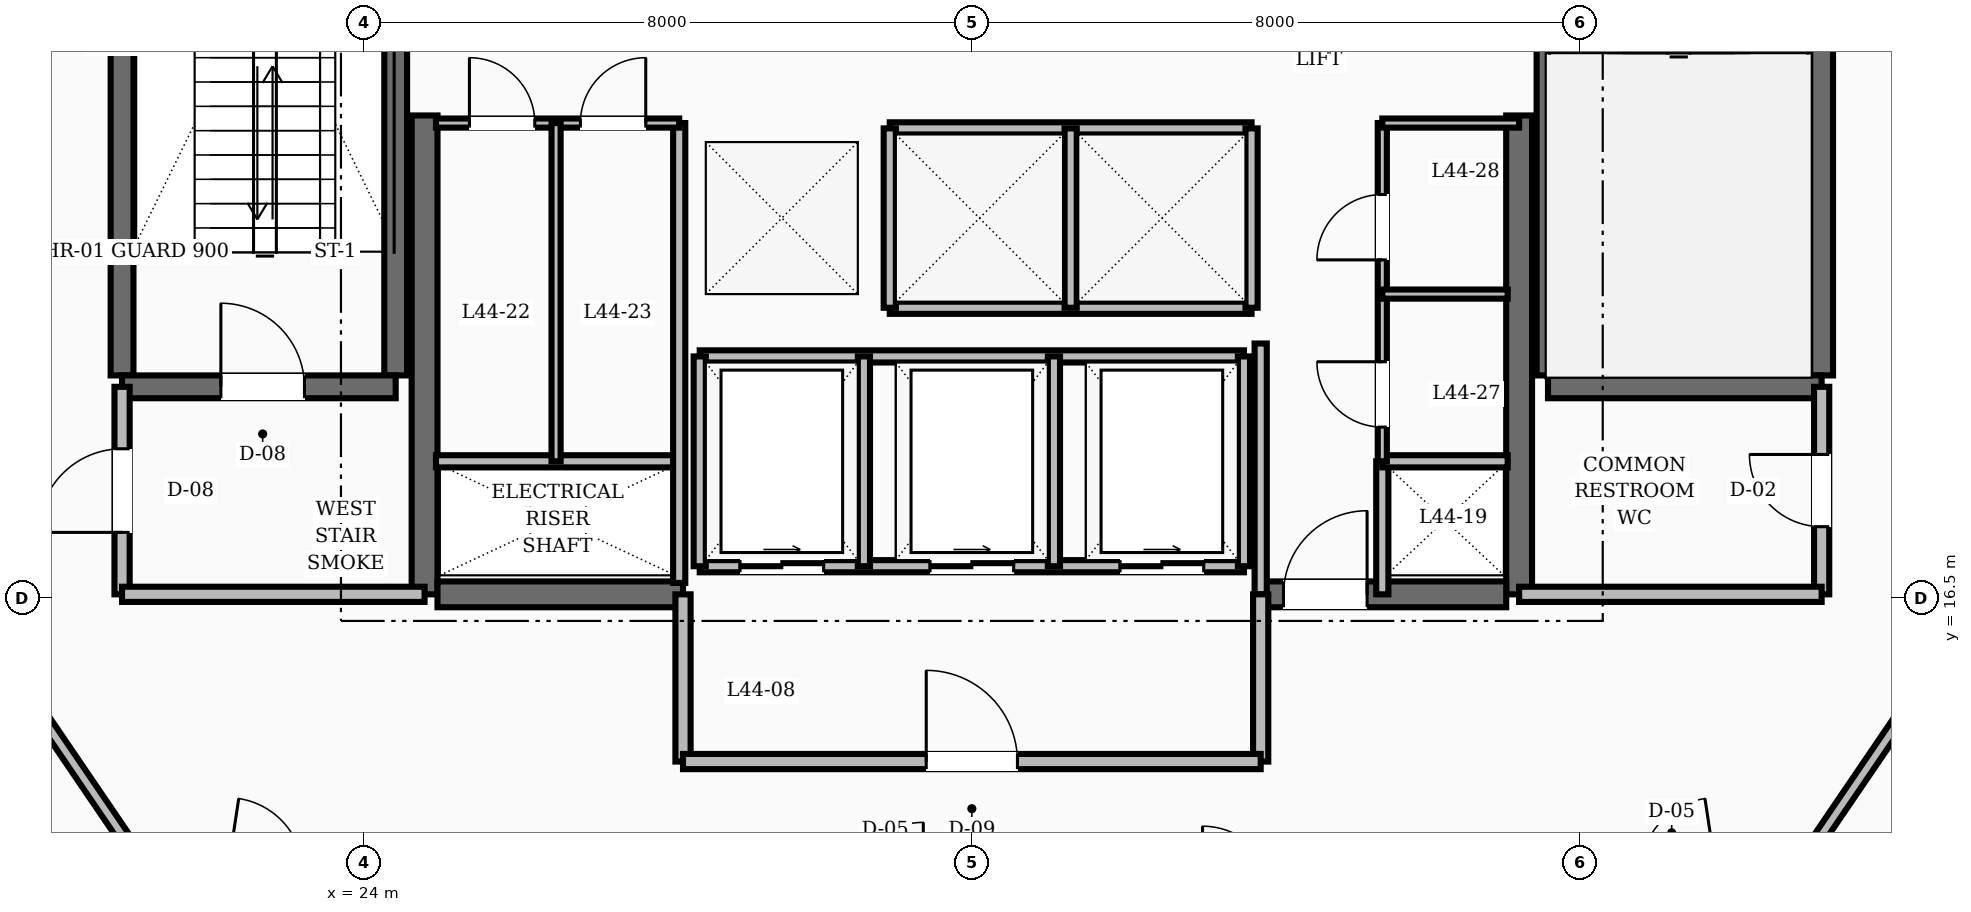
"""IFC4 building model, lengths in metres.
Left out: names, types, materials, properties, quantities, classifications, styles, units other than length and angle.
Written with IfcOpenShell. Run it as: python <this file> out.ifc"""

import sys

from ifc_helpers import new_model, si_unit, direction, frame, frame_2d, origin, place, context, subcontext, project, spatial, rectangle, extrude, element, fill, save


model = new_model("IFC4")
c1 = context("Model", 3, precision=1e-05, world=origin(), true_north=direction((0.0, 1.0)))
c2 = subcontext(c1, "Body", "Model", "MODEL_VIEW")
j1 = project(units=[si_unit("LENGTHUNIT", "METRE"), si_unit("PLANEANGLEUNIT", "RADIAN")], contexts=[c1])
p1 = place(None, origin())
s1 = spatial("IfcSite", under=j1, at=p1, CompositionType="ELEMENT")
p2 = place(p1, origin())
s2 = spatial("IfcBuilding", under=s1, at=p2, CompositionType="ELEMENT")
p3 = place(p2, frame((0.0, 0.0, 171.2)))
s3 = spatial("IfcBuildingStorey", under=s2, at=p3, CompositionType="ELEMENT", Elevation=171.2)
for number, where, z_axis, x_axis in (
    (1, (24.8, 16.55, 0.0), (0.0, 0.0, 1.0), (0.0, 1.0, 0.0)),
    (2, (39.2, 16.55, 0.0), (0.0, 0.0, 1.0), (0.0, 1.0, 0.0)),
):
    element("IfcWall", number, at=place(p3, frame(where, z_axis=z_axis, x_axis=x_axis)), inside=s3, PredefinedType="SHEAR", context=c2, shape_type="SweptSolid", body=[
        extrude(rectangle(XDim=6.3, YDim=0.34, at=frame_2d((3.15, 0.0))), origin(), (0.0, 0.0, 1.0), 3.6),
    ])
p4 = place(p3, frame((24.97, 16.55, 0.0), z_axis=(0.0, 0.0, 1.0), x_axis=(1.0, 0.0, 0.0)))
e3 = element("IfcWall", 3, at=p4, inside=s3, PredefinedType="SHEAR", context=c2, shape_type="SweptSolid", body=[
    extrude(rectangle(XDim=3.23, YDim=0.34, at=frame_2d((1.615, 0.0))), origin(), (0.0, 0.0, 1.0), 3.6),
])
p5 = place(p3, frame((35.8, 16.55, 0.0), z_axis=(0.0, 0.0, 1.0), x_axis=(1.0, 0.0, 0.0)))
e4 = element("IfcWall", 4, at=p5, inside=s3, PredefinedType="SHEAR", context=c2, shape_type="SweptSolid", body=[
    extrude(rectangle(XDim=3.23, YDim=0.34, at=frame_2d((1.615, 0.0))), origin(), (0.0, 0.0, 1.0), 3.6),
])
p6 = place(p5, frame((0.3, 0.0, 0.0)))
e5 = element("IfcOpeningElement", 5, at=p6, cuts=e4, PredefinedType="OPENING", context=c2, shape_type="SweptSolid", body=[
    extrude(rectangle(XDim=1.1, YDim=2.1, at=frame_2d((0.55, 1.05))), frame((0.0, 0.18, 0.0), z_axis=(0.0, -1.0, 0.0), x_axis=(1.0, 0.0, 0.0)), (0.0, 0.0, 1.0), 0.36),
])
for number, where, z_axis, x_axis in (
    (6, (20.82, 19.43, 0.0), (0.0, 0.0, 1.0), (0.0, 1.0, 0.0)),
    (7, (24.42, 19.43, 0.0), (0.0, 0.0, 1.0), (0.0, 1.0, 0.0)),
):
    element("IfcWall", number, at=place(p3, frame(where, z_axis=z_axis, x_axis=x_axis)), inside=s3, PredefinedType="SHEAR", context=c2, shape_type="SweptSolid", body=[
        extrude(rectangle(XDim=8.74, YDim=0.3, at=frame_2d((4.37, 0.0))), origin(), (0.0, 0.0, 1.0), 3.6),
    ])
p7 = place(p3, frame((20.82, 19.28, 0.0), z_axis=(0.0, 0.0, 1.0), x_axis=(1.0, 0.0, 0.0)))
e8 = element("IfcWall", 8, at=p7, inside=s3, PredefinedType="SHEAR", context=c2, shape_type="SweptSolid", body=[
    extrude(rectangle(XDim=3.6, YDim=0.3, at=frame_2d((1.8, 0.0))), origin(), (0.0, 0.0, 1.0), 3.6),
])
p8 = place(p7, frame((1.3, 0.0, 0.0)))
e9 = element("IfcOpeningElement", 9, at=p8, cuts=e8, PredefinedType="OPENING", context=c2, shape_type="SweptSolid", body=[
    extrude(rectangle(XDim=1.1, YDim=2.1, at=frame_2d((0.55, 1.05))), frame((0.0, 0.16, 0.0), z_axis=(0.0, -1.0, 0.0), x_axis=(1.0, 0.0, 0.0)), (0.0, 0.0, 1.0), 0.32),
])
for number, where, z_axis, x_axis in (
    (10, (43.18, 19.43, 0.0), (0.0, 0.0, 1.0), (0.0, 1.0, 0.0)),
    (11, (39.58, 19.43, 0.0), (0.0, 0.0, 1.0), (0.0, 1.0, 0.0)),
):
    element("IfcWall", number, at=place(p3, frame(where, z_axis=z_axis, x_axis=x_axis)), inside=s3, PredefinedType="SHEAR", context=c2, shape_type="SweptSolid", body=[
        extrude(rectangle(XDim=8.74, YDim=0.3, at=frame_2d((4.37, 0.0))), origin(), (0.0, 0.0, 1.0), 3.6),
    ])
p9 = place(p3, frame((39.58, 19.28, 0.0), z_axis=(0.0, 0.0, 1.0), x_axis=(1.0, 0.0, 0.0)))
e12 = element("IfcWall", 12, at=p9, inside=s3, PredefinedType="SHEAR", context=c2, shape_type="SweptSolid", body=[
    extrude(rectangle(XDim=3.6, YDim=0.3, at=frame_2d((1.8, 0.0))), origin(), (0.0, 0.0, 1.0), 3.6),
])
p10 = place(p3, frame((20.82, 16.55, 0.0), z_axis=(0.0, 0.0, 1.0), x_axis=(0.0, 1.0, 0.0)))
e13 = element("IfcWall", 13, at=p10, inside=s3, PredefinedType="SOLIDWALL", context=c2, shape_type="SweptSolid", body=[
    extrude(rectangle(XDim=2.73, YDim=0.2, at=frame_2d((1.365, 0.0))), origin(), (0.0, 0.0, 1.0), 2.8),
])
p11 = place(p10, frame((0.815, 0.0, 0.0)))
e14 = element("IfcOpeningElement", 14, at=p11, cuts=e13, PredefinedType="OPENING", context=c2, shape_type="SweptSolid", body=[
    extrude(rectangle(XDim=1.1, YDim=2.1, at=frame_2d((0.55, 1.05))), frame((0.0, 0.11, 0.0), z_axis=(0.0, -1.0, 0.0), x_axis=(1.0, 0.0, 0.0)), (0.0, 0.0, 1.0), 0.22),
])
p12 = place(p3, frame((20.82, 16.55, 0.0), z_axis=(0.0, 0.0, 1.0), x_axis=(1.0, 0.0, 0.0)))
e15 = element("IfcWall", 15, at=p12, inside=s3, PredefinedType="SOLIDWALL", context=c2, shape_type="SweptSolid", body=[
    extrude(rectangle(XDim=3.98, YDim=0.2, at=frame_2d((1.99, 0.0))), origin(), (0.0, 0.0, 1.0), 2.8),
])
p13 = place(p3, frame((43.18, 16.55, 0.0), z_axis=(0.0, 0.0, 1.0), x_axis=(0.0, 1.0, 0.0)))
e16 = element("IfcWall", 16, at=p13, inside=s3, PredefinedType="SOLIDWALL", context=c2, shape_type="SweptSolid", body=[
    extrude(rectangle(XDim=2.73, YDim=0.2, at=frame_2d((1.365, 0.0))), origin(), (0.0, 0.0, 1.0), 2.8),
])
p14 = place(p13, frame((0.89, 0.0, 0.0)))
e17 = element("IfcOpeningElement", 17, at=p14, cuts=e16, PredefinedType="OPENING", context=c2, shape_type="SweptSolid", body=[
    extrude(rectangle(XDim=0.95, YDim=2.1, at=frame_2d((0.475, 1.05))), frame((0.0, 0.11, 0.0), z_axis=(0.0, -1.0, 0.0), x_axis=(1.0, 0.0, 0.0)), (0.0, 0.0, 1.0), 0.22),
])
p15 = place(p3, frame((39.2, 16.55, 0.0), z_axis=(0.0, 0.0, 1.0), x_axis=(1.0, 0.0, 0.0)))
e18 = element("IfcWall", 18, at=p15, inside=s3, PredefinedType="SOLIDWALL", context=c2, shape_type="SweptSolid", body=[
    extrude(rectangle(XDim=3.98, YDim=0.2, at=frame_2d((1.99, 0.0))), origin(), (0.0, 0.0, 1.0), 2.8),
])
p16 = place(p3, frame((35.8, 16.55, 0.0), z_axis=(0.0, 0.0, 1.0), x_axis=(0.0, 1.0, 0.0)))
e19 = element("IfcWall", 19, at=p16, inside=s3, PredefinedType="SOLIDWALL", context=c2, shape_type="SweptSolid", body=[
    extrude(rectangle(XDim=3.3, YDim=0.16, at=frame_2d((1.65, 0.0))), origin(), (0.0, 0.0, 1.0), 2.8),
])
p17 = place(p3, frame((37.4, 16.55, 0.0), z_axis=(0.0, 0.0, 1.0), x_axis=(0.0, 1.0, 0.0)))
e20 = element("IfcWall", 20, at=p17, inside=s3, PredefinedType="SOLIDWALL", context=c2, shape_type="SweptSolid", body=[
    extrude(rectangle(XDim=1.75, YDim=0.16, at=frame_2d((0.875, 0.0))), origin(), (0.0, 0.0, 1.0), 2.8),
])
for number, where, z_axis, x_axis in (
    (21, (28.2, 14.35, 0.0), (0.0, 0.0, 1.0), (0.0, 1.0, 0.0)),
    (22, (35.8, 14.35, 0.0), (0.0, 0.0, 1.0), (0.0, 1.0, 0.0)),
):
    element("IfcWall", number, at=place(p3, frame(where, z_axis=z_axis, x_axis=x_axis)), inside=s3, PredefinedType="SOLIDWALL", context=c2, shape_type="SweptSolid", body=[
        extrude(rectangle(XDim=2.2, YDim=0.2, at=frame_2d((1.1, 0.0))), origin(), (0.0, 0.0, 1.0), 2.8),
    ])
p18 = place(p3, frame((28.2, 14.35, 0.0), z_axis=(0.0, 0.0, 1.0), x_axis=(1.0, 0.0, 0.0)))
e23 = element("IfcWall", 23, at=p18, inside=s3, PredefinedType="SOLIDWALL", context=c2, shape_type="SweptSolid", body=[
    extrude(rectangle(XDim=7.6, YDim=0.2, at=frame_2d((3.8, 0.0))), origin(), (0.0, 0.0, 1.0), 2.8),
])
p19 = place(p18, frame((3.2, 0.0, 0.0)))
e24 = element("IfcOpeningElement", 24, at=p19, cuts=e23, PredefinedType="OPENING", context=c2, shape_type="SweptSolid", body=[
    extrude(rectangle(XDim=1.2, YDim=2.1, at=frame_2d((0.6, 1.05))), frame((0.0, 0.11, 0.0), z_axis=(0.0, -1.0, 0.0), x_axis=(1.0, 0.0, 0.0)), (0.0, 0.0, 1.0), 0.22),
])
for number, where, z_axis, x_axis in (
    (25, (30.92, 22.68, 0.0), (0.0, 0.0, 1.0), (1.0, 0.0, 0.0)),
    (26, (30.92, 20.32, 0.0), (0.0, 0.0, 1.0), (1.0, 0.0, 0.0)),
):
    element("IfcWall", number, at=place(p3, frame(where, z_axis=z_axis, x_axis=x_axis)), inside=s3, PredefinedType="SOLIDWALL", context=c2, shape_type="SweptSolid", body=[
        extrude(rectangle(XDim=4.76, YDim=0.16, at=frame_2d((2.38, 0.0))), origin(), (0.0, 0.0, 1.0), 2.8),
    ])
for number, where, z_axis, x_axis in (
    (27, (30.92, 20.32, 0.0), (0.0, 0.0, 1.0), (0.0, 1.0, 0.0)),
    (28, (33.3, 20.32, 0.0), (0.0, 0.0, 1.0), (0.0, 1.0, 0.0)),
    (29, (35.68, 20.32, 0.0), (0.0, 0.0, 1.0), (0.0, 1.0, 0.0)),
):
    element("IfcWall", number, at=place(p3, frame(where, z_axis=z_axis, x_axis=x_axis)), inside=s3, PredefinedType="SOLIDWALL", context=c2, shape_type="SweptSolid", body=[
        extrude(rectangle(XDim=2.36, YDim=0.16, at=frame_2d((1.18, 0.0))), origin(), (0.0, 0.0, 1.0), 2.8),
    ])
p20 = place(p3, frame((28.42, 16.92, 0.0), z_axis=(0.0, 0.0, 1.0), x_axis=(1.0, 0.0, 0.0)))
e30 = element("IfcWall", 30, at=p20, inside=s3, PredefinedType="SOLIDWALL", context=c2, shape_type="SweptSolid", body=[
    extrude(rectangle(XDim=7.16, YDim=0.16, at=frame_2d((3.58, 0.0))), origin(), (0.0, 0.0, 1.0), 2.8),
])
p21 = place(p20, frame((0.53, 0.0, 0.0)))
e31 = element("IfcOpeningElement", 31, at=p21, cuts=e30, PredefinedType="OPENING", context=c2, shape_type="SweptSolid", body=[
    extrude(rectangle(XDim=1.1, YDim=2.15, at=frame_2d((0.55, 1.075))), frame((0.0, 0.09, 0.0), z_axis=(0.0, -1.0, 0.0), x_axis=(1.0, 0.0, 0.0)), (0.0, 0.0, 1.0), 0.18),
])
p22 = place(p20, frame((3.03, 0.0, 0.0)))
e32 = element("IfcOpeningElement", 32, at=p22, cuts=e30, PredefinedType="OPENING", context=c2, shape_type="SweptSolid", body=[
    extrude(rectangle(XDim=1.1, YDim=2.15, at=frame_2d((0.55, 1.075))), frame((0.0, 0.09, 0.0), z_axis=(0.0, -1.0, 0.0), x_axis=(1.0, 0.0, 0.0)), (0.0, 0.0, 1.0), 0.18),
])
p23 = place(p20, frame((5.53, 0.0, 0.0)))
e33 = element("IfcOpeningElement", 33, at=p23, cuts=e30, PredefinedType="OPENING", context=c2, shape_type="SweptSolid", body=[
    extrude(rectangle(XDim=1.1, YDim=2.15, at=frame_2d((0.55, 1.075))), frame((0.0, 0.09, 0.0), z_axis=(0.0, -1.0, 0.0), x_axis=(1.0, 0.0, 0.0)), (0.0, 0.0, 1.0), 0.18),
])
p24 = place(p3, frame((28.42, 19.68, 0.0), z_axis=(0.0, 0.0, 1.0), x_axis=(1.0, 0.0, 0.0)))
e34 = element("IfcWall", 34, at=p24, inside=s3, PredefinedType="SOLIDWALL", context=c2, shape_type="SweptSolid", body=[
    extrude(rectangle(XDim=7.16, YDim=0.16, at=frame_2d((3.58, 0.0))), origin(), (0.0, 0.0, 1.0), 2.8),
])
for number, where, z_axis, x_axis in (
    (35, (28.42, 16.92, 0.0), (0.0, 0.0, 1.0), (0.0, 1.0, 0.0)),
    (36, (30.58, 16.92, 0.0), (0.0, 0.0, 1.0), (0.0, 1.0, 0.0)),
    (37, (33.08, 16.92, 0.0), (0.0, 0.0, 1.0), (0.0, 1.0, 0.0)),
    (38, (35.58, 16.92, 0.0), (0.0, 0.0, 1.0), (0.0, 1.0, 0.0)),
):
    element("IfcWall", number, at=place(p3, frame(where, z_axis=z_axis, x_axis=x_axis)), inside=s3, PredefinedType="SOLIDWALL", context=c2, shape_type="SweptSolid", body=[
        extrude(rectangle(XDim=2.76, YDim=0.16, at=frame_2d((1.38, 0.0))), origin(), (0.0, 0.0, 1.0), 2.8),
    ])
p25 = place(p3, frame((24.95, 18.3, 0.0), z_axis=(0.0, 0.0, 1.0), x_axis=(1.0, 0.0, 0.0)))
e39 = element("IfcWall", 39, at=p25, inside=s3, PredefinedType="SOLIDWALL", context=c2, shape_type="SweptSolid", body=[
    extrude(rectangle(XDim=3.2, YDim=0.16, at=frame_2d((1.6, 0.0))), origin(), (0.0, 0.0, 1.0), 2.8),
])
p26 = place(p3, frame((28.15, 16.7, 0.0), z_axis=(0.0, 0.0, 1.0), x_axis=(0.0, 1.0, 0.0)))
e40 = element("IfcWall", 40, at=p26, inside=s3, PredefinedType="SOLIDWALL", context=c2, shape_type="SweptSolid", body=[
    extrude(rectangle(XDim=6.05, YDim=0.16, at=frame_2d((3.025, 0.0))), origin(), (0.0, 0.0, 1.0), 2.8),
])
p27 = place(p3, frame((37.4, 18.3, 0.0), z_axis=(0.0, 0.0, 1.0), x_axis=(1.0, 0.0, 0.0)))
e41 = element("IfcWall", 41, at=p27, inside=s3, PredefinedType="SOLIDWALL", context=c2, shape_type="SweptSolid", body=[
    extrude(rectangle(XDim=1.65, YDim=0.16, at=frame_2d((0.825, 0.0))), origin(), (0.0, 0.0, 1.0), 2.8),
])
p28 = place(p3, frame((24.95, 22.75, 0.0), z_axis=(0.0, 0.0, 1.0), x_axis=(1.0, 0.0, 0.0)))
e42 = element("IfcWall", 42, at=p28, inside=s3, PredefinedType="PARTITIONING", context=c2, shape_type="SweptSolid", body=[
    extrude(rectangle(XDim=3.2, YDim=0.12, at=frame_2d((1.6, 0.0))), origin(), (0.0, 0.0, 1.0), 2.8),
])
p29 = place(p28, frame((0.44, 0.0, 0.0)))
e43 = element("IfcOpeningElement", 43, at=p29, cuts=e42, PredefinedType="OPENING", context=c2, shape_type="SweptSolid", body=[
    extrude(rectangle(XDim=0.86, YDim=2.1, at=frame_2d((0.43, 1.05))), frame((0.0, 0.07, 0.0), z_axis=(0.0, -1.0, 0.0), x_axis=(1.0, 0.0, 0.0)), (0.0, 0.0, 1.0), 0.14),
])
p30 = place(p28, frame((1.9, 0.0, 0.0)))
e44 = element("IfcOpeningElement", 44, at=p30, cuts=e42, PredefinedType="OPENING", context=c2, shape_type="SweptSolid", body=[
    extrude(rectangle(XDim=0.86, YDim=2.1, at=frame_2d((0.43, 1.05))), frame((0.0, 0.07, 0.0), z_axis=(0.0, -1.0, 0.0), x_axis=(1.0, 0.0, 0.0)), (0.0, 0.0, 1.0), 0.14),
])
p31 = place(p3, frame((37.4, 18.3, 0.0), z_axis=(0.0, 0.0, 1.0), x_axis=(0.0, 1.0, 0.0)))
e45 = element("IfcWall", 45, at=p31, inside=s3, PredefinedType="PARTITIONING", context=c2, shape_type="SweptSolid", body=[
    extrude(rectangle(XDim=4.45, YDim=0.12, at=frame_2d((2.225, 0.0))), origin(), (0.0, 0.0, 1.0), 2.8),
])
p32 = place(p31, frame((0.45, 0.0, 0.0)))
e46 = element("IfcOpeningElement", 46, at=p32, cuts=e45, PredefinedType="OPENING", context=c2, shape_type="SweptSolid", body=[
    extrude(rectangle(XDim=0.86, YDim=2.1, at=frame_2d((0.43, 1.05))), frame((0.0, 0.07, 0.0), z_axis=(0.0, -1.0, 0.0), x_axis=(1.0, 0.0, 0.0)), (0.0, 0.0, 1.0), 0.14),
])
p33 = place(p31, frame((2.65, 0.0, 0.0)))
e47 = element("IfcOpeningElement", 47, at=p33, cuts=e45, PredefinedType="OPENING", context=c2, shape_type="SweptSolid", body=[
    extrude(rectangle(XDim=0.86, YDim=2.1, at=frame_2d((0.43, 1.05))), frame((0.0, 0.07, 0.0), z_axis=(0.0, -1.0, 0.0), x_axis=(1.0, 0.0, 0.0)), (0.0, 0.0, 1.0), 0.14),
])
p34 = place(p3, frame((37.4, 22.75, 0.0), z_axis=(0.0, 0.0, 1.0), x_axis=(1.0, 0.0, 0.0)))
e48 = element("IfcWall", 48, at=p34, inside=s3, PredefinedType="PARTITIONING", context=c2, shape_type="SweptSolid", body=[
    extrude(rectangle(XDim=1.8, YDim=0.12, at=frame_2d((0.9, 0.0))), origin(), (0.0, 0.0, 1.0), 2.8),
])
p35 = place(p3, frame((26.53, 18.3, 0.0), z_axis=(0.0, 0.0, 1.0), x_axis=(0.0, 1.0, 0.0)))
e49 = element("IfcWall", 49, at=p35, inside=s3, PredefinedType="PARTITIONING", context=c2, shape_type="SweptSolid", body=[
    extrude(rectangle(XDim=4.45, YDim=0.12, at=frame_2d((2.225, 0.0))), origin(), (0.0, 0.0, 1.0), 2.8),
])
p36 = place(p3, frame((37.4, 20.5, 0.0), z_axis=(0.0, 0.0, 1.0), x_axis=(1.0, 0.0, 0.0)))
e50 = element("IfcWall", 50, at=p36, inside=s3, PredefinedType="PARTITIONING", context=c2, shape_type="SweptSolid", body=[
    extrude(rectangle(XDim=1.65, YDim=0.12, at=frame_2d((0.825, 0.0))), origin(), (0.0, 0.0, 1.0), 2.8),
])
for number, where, z_axis, x_axis in (
    (51, (19.35, 15.548, 0.0), (0.0, 0.0, 1.0), (0.563, -0.827, 0.0)),
    (52, (42.95, 13.05, 0.0), (0.0, 0.0, 1.0), (0.563, 0.827, 0.0)),
):
    element("IfcWall", number, at=place(p3, frame(where, z_axis=z_axis, x_axis=x_axis)), inside=s3, PredefinedType="SOLIDWALL", context=c2, shape_type="SweptSolid", body=[
        extrude(rectangle(XDim=3.021, YDim=0.16, at=frame_2d((1.511, 0.0))), origin(), (0.0, 0.0, 1.0), 2.8),
    ])
p37 = place(p8, origin())
e53 = element("IfcDoor", 53, at=p37, inside=s3, OperationType="SINGLE_SWING_LEFT", PredefinedType="DOOR", context=c2, shape_type="SweptSolid", body=[
    extrude(rectangle(XDim=1.1, YDim=2.1, at=frame_2d((0.55, 1.05))), frame((0.0, 0.025, 0.0), z_axis=(0.0, -1.0, 0.0), x_axis=(1.0, 0.0, 0.0)), (0.0, 0.0, 1.0), 0.05),
])
fill(e9, e53)
p38 = place(p11, origin())
e54 = element("IfcDoor", 54, at=p38, inside=s3, OperationType="SINGLE_SWING_LEFT", PredefinedType="DOOR", context=c2, shape_type="SweptSolid", body=[
    extrude(rectangle(XDim=1.1, YDim=2.1, at=frame_2d((0.55, 1.05))), frame((0.0, 0.025, 0.0), z_axis=(0.0, -1.0, 0.0), x_axis=(1.0, 0.0, 0.0)), (0.0, 0.0, 1.0), 0.05),
])
fill(e14, e54)
p39 = place(p14, origin())
e55 = element("IfcDoor", 55, at=p39, inside=s3, OperationType="SINGLE_SWING_RIGHT", PredefinedType="DOOR", context=c2, shape_type="SweptSolid", body=[
    extrude(rectangle(XDim=0.95, YDim=2.1, at=frame_2d((0.475, 1.05))), frame((0.0, 0.025, 0.0), z_axis=(0.0, -1.0, 0.0), x_axis=(1.0, 0.0, 0.0)), (0.0, 0.0, 1.0), 0.05),
])
fill(e17, e55)
p40 = place(p6, origin())
e56 = element("IfcDoor", 56, at=p40, inside=s3, OperationType="SINGLE_SWING_RIGHT", PredefinedType="DOOR", context=c2, shape_type="SweptSolid", body=[
    extrude(rectangle(XDim=1.1, YDim=2.1, at=frame_2d((0.55, 1.05))), frame((0.0, 0.025, 0.0), z_axis=(0.0, -1.0, 0.0), x_axis=(1.0, 0.0, 0.0)), (0.0, 0.0, 1.0), 0.05),
])
fill(e5, e56)
p41 = place(p19, origin())
e57 = element("IfcDoor", 57, at=p41, inside=s3, OperationType="SINGLE_SWING_LEFT", PredefinedType="DOOR", context=c2, shape_type="SweptSolid", body=[
    extrude(rectangle(XDim=1.2, YDim=2.1, at=frame_2d((0.6, 1.05))), frame((0.0, 0.025, 0.0), z_axis=(0.0, -1.0, 0.0), x_axis=(1.0, 0.0, 0.0)), (0.0, 0.0, 1.0), 0.05),
])
fill(e24, e57)
p42 = place(p21, origin())
e58 = element("IfcDoor", 58, at=p42, inside=s3, OperationType="SLIDING_TO_RIGHT", PredefinedType="DOOR", context=c2, shape_type="SweptSolid", body=[
    extrude(rectangle(XDim=1.1, YDim=2.15, at=frame_2d((0.55, 1.075))), frame((0.0, 0.025, 0.0), z_axis=(0.0, -1.0, 0.0), x_axis=(1.0, 0.0, 0.0)), (0.0, 0.0, 1.0), 0.05),
])
fill(e31, e58)
p43 = place(p22, origin())
e59 = element("IfcDoor", 59, at=p43, inside=s3, OperationType="SLIDING_TO_RIGHT", PredefinedType="DOOR", context=c2, shape_type="SweptSolid", body=[
    extrude(rectangle(XDim=1.1, YDim=2.15, at=frame_2d((0.55, 1.075))), frame((0.0, 0.025, 0.0), z_axis=(0.0, -1.0, 0.0), x_axis=(1.0, 0.0, 0.0)), (0.0, 0.0, 1.0), 0.05),
])
fill(e32, e59)
p44 = place(p23, origin())
e60 = element("IfcDoor", 60, at=p44, inside=s3, OperationType="SLIDING_TO_RIGHT", PredefinedType="DOOR", context=c2, shape_type="SweptSolid", body=[
    extrude(rectangle(XDim=1.1, YDim=2.15, at=frame_2d((0.55, 1.075))), frame((0.0, 0.025, 0.0), z_axis=(0.0, -1.0, 0.0), x_axis=(1.0, 0.0, 0.0)), (0.0, 0.0, 1.0), 0.05),
])
fill(e33, e60)
p45 = place(p29, origin())
e61 = element("IfcDoor", 61, at=p45, inside=s3, OperationType="SINGLE_SWING_LEFT", PredefinedType="DOOR", context=c2, shape_type="SweptSolid", body=[
    extrude(rectangle(XDim=0.86, YDim=2.1, at=frame_2d((0.43, 1.05))), frame((0.0, 0.025, 0.0), z_axis=(0.0, -1.0, 0.0), x_axis=(1.0, 0.0, 0.0)), (0.0, 0.0, 1.0), 0.05),
])
fill(e43, e61)
p46 = place(p30, origin())
e62 = element("IfcDoor", 62, at=p46, inside=s3, OperationType="SINGLE_SWING_RIGHT", PredefinedType="DOOR", context=c2, shape_type="SweptSolid", body=[
    extrude(rectangle(XDim=0.86, YDim=2.1, at=frame_2d((0.43, 1.05))), frame((0.0, 0.025, 0.0), z_axis=(0.0, -1.0, 0.0), x_axis=(1.0, 0.0, 0.0)), (0.0, 0.0, 1.0), 0.05),
])
fill(e44, e62)
p47 = place(p32, origin())
e63 = element("IfcDoor", 63, at=p47, inside=s3, OperationType="SINGLE_SWING_RIGHT", PredefinedType="DOOR", context=c2, shape_type="SweptSolid", body=[
    extrude(rectangle(XDim=0.86, YDim=2.1, at=frame_2d((0.43, 1.05))), frame((0.0, 0.025, 0.0), z_axis=(0.0, -1.0, 0.0), x_axis=(1.0, 0.0, 0.0)), (0.0, 0.0, 1.0), 0.05),
])
fill(e46, e63)
p48 = place(p33, origin())
e64 = element("IfcDoor", 64, at=p48, inside=s3, OperationType="SINGLE_SWING_LEFT", PredefinedType="DOOR", context=c2, shape_type="SweptSolid", body=[
    extrude(rectangle(XDim=0.86, YDim=2.1, at=frame_2d((0.43, 1.05))), frame((0.0, 0.025, 0.0), z_axis=(0.0, -1.0, 0.0), x_axis=(1.0, 0.0, 0.0)), (0.0, 0.0, 1.0), 0.05),
])
fill(e47, e64)
save(model, sys.argv[1])
